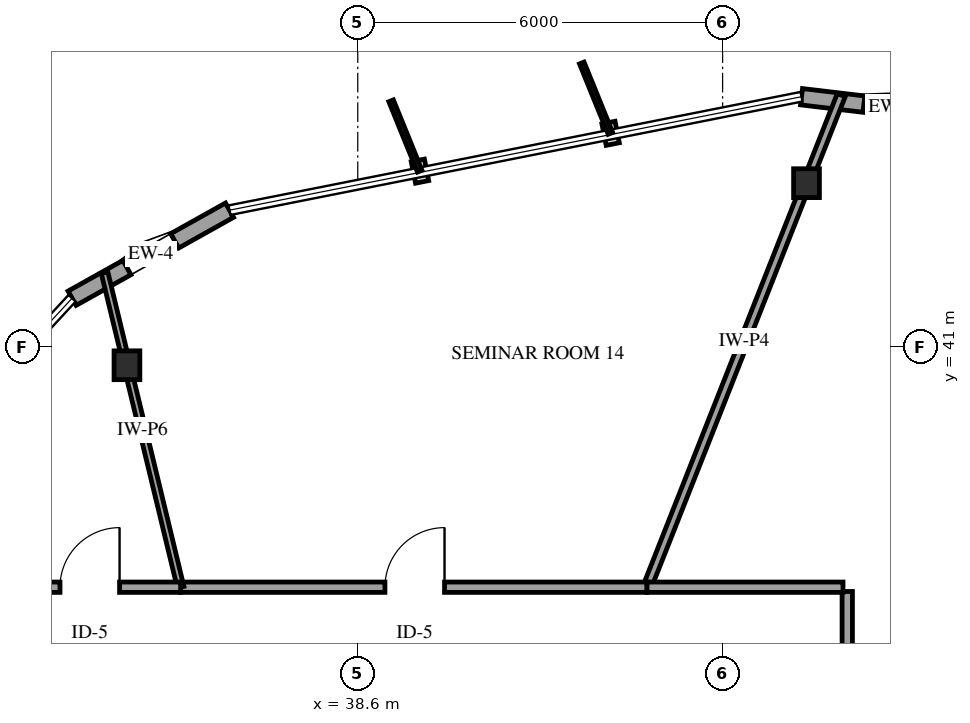
"""IFC4 building model, lengths in metres.
Left out: names, types, materials, properties, quantities, classifications, styles, units other than length and angle.
Written with IfcOpenShell. Run it as: python <this file> out.ifc"""

import sys

from ifc_helpers import new_model, si_unit, direction, frame, frame_2d, origin, origin_2d, place, context, subcontext, project, spatial, rectangle, i_section, extrude, element, fill, save


model = new_model("IFC4")
c1 = context("Model", 3, precision=1e-05, world=origin(), true_north=direction((0.0, 1.0)))
c2 = subcontext(c1, "Body", "Model", "MODEL_VIEW")
j1 = project(units=[si_unit("LENGTHUNIT", "METRE"), si_unit("PLANEANGLEUNIT", "RADIAN")], contexts=[c1])
p1 = place(None, origin())
s1 = spatial("IfcSite", under=j1, at=p1, CompositionType="ELEMENT")
p2 = place(p1, origin())
s2 = spatial("IfcBuilding", under=s1, at=p2, CompositionType="ELEMENT")
p3 = place(p2, frame((0.0, 0.0, 70.6)))
s3 = spatial("IfcBuildingStorey", under=s2, at=p3, CompositionType="ELEMENT", Elevation=70.6)
for number, where, z_axis, x_axis in (
    (1, (45.98, 43.694, 0.0), (0.0, 0.0, 1.0), (1.0, 0.0, 0.0)),
    (2, (34.804, 40.7, 0.0), (0.0, 0.0, 1.0), (1.0, 0.0, 0.0)),
):
    element("IfcColumn", number, at=place(p3, frame(where, z_axis=z_axis, x_axis=x_axis)), inside=s3, PredefinedType="COLUMN", context=c2, shape_type="SweptSolid", body=[
        extrude(i_section(OverallWidth=0.424, OverallDepth=0.474, WebThickness=0.048, FlangeThickness=0.077, FilletRadius=0.038, at=origin_2d()), origin(), (0.0, 0.0, 1.0), 4.0),
    ])
p4 = place(p3, frame((48.844, 44.766, 0.0), z_axis=(0.0, 0.0, 1.0), x_axis=(-0.993011715875, 0.118015813075, 0.0)))
e3 = element("IfcWall", 3, at=p4, inside=s3, PredefinedType="SOLIDWALL", context=c2, shape_type="SweptSolid", body=[
    extrude(rectangle(XDim=2.967, YDim=0.27, at=frame_2d((1.483, 0.0))), origin(), (0.0, 0.0, 1.0), 3.079),
])
p5 = place(p4, frame((1.033, 0.0, 0.75)))
e4 = element("IfcOpeningElement", 4, at=p5, cuts=e3, PredefinedType="OPENING", context=c2, shape_type="SweptSolid", body=[
    extrude(rectangle(XDim=0.9, YDim=1.5, at=frame_2d((0.45, 0.75))), frame((0.0, 0.145, 0.0), z_axis=(0.0, -1.0, 0.0), x_axis=(1.0, 0.0, 0.0)), (0.0, 0.0, 1.0), 0.29),
])
p6 = place(p3, frame((36.491, 43.25, 0.0), z_axis=(0.0, 0.0, 1.0), x_axis=(-0.872744478874, -0.48817729832, 0.0)))
e5 = element("IfcWall", 5, at=p6, inside=s3, PredefinedType="SOLIDWALL", context=c2, shape_type="SweptSolid", body=[
    extrude(rectangle(XDim=2.967, YDim=0.27, at=frame_2d((1.483, 0.0))), origin(), (0.0, 0.0, 1.0), 3.079),
])
p7 = place(p6, frame((1.033, 0.0, 0.75)))
e6 = element("IfcOpeningElement", 6, at=p7, cuts=e5, PredefinedType="OPENING", context=c2, shape_type="SweptSolid", body=[
    extrude(rectangle(XDim=0.9, YDim=1.5, at=frame_2d((0.45, 0.75))), frame((0.0, 0.145, 0.0), z_axis=(0.0, -1.0, 0.0), x_axis=(1.0, 0.0, 0.0)), (0.0, 0.0, 1.0), 0.29),
])
p8 = place(p3, frame((46.65, 31.442, 0.0), z_axis=(0.0, 0.0, 1.0), x_axis=(0.780822711773, 0.624752665284, 0.0)))
e7 = element("IfcWall", 7, at=p8, inside=s3, PredefinedType="PARTITIONING", context=c2, shape_type="SweptSolid", body=[
    extrude(rectangle(XDim=14.468, YDim=0.11, at=frame_2d((7.234, 0.0))), origin(), (0.0, 0.0, 1.0), 3.7),
])
p9 = place(p3, frame((43.357, 37.05, 0.0), z_axis=(0.0, 0.0, 1.0), x_axis=(0.36715311674, 0.930160517797, 0.0)))
e8 = element("IfcWall", 8, at=p9, inside=s3, PredefinedType="PARTITIONING", context=c2, shape_type="SweptSolid", body=[
    extrude(rectangle(XDim=8.7, YDim=0.14, at=frame_2d((4.35, 0.0))), origin(), (0.0, 0.0, 1.0), 2.995),
])
p10 = place(p3, frame((35.687, 37.05, 0.0), z_axis=(0.0, 0.0, 1.0), x_axis=(1.0, 0.0, 0.0)))
e9 = element("IfcWall", 9, at=p10, inside=s3, PredefinedType="PARTITIONING", context=c2, shape_type="SweptSolid", body=[
    extrude(rectangle(XDim=7.67, YDim=0.17, at=frame_2d((3.835, 0.0))), origin(), (0.0, 0.0, 1.0), 3.7),
])
p11 = place(p10, frame((3.36, 0.0, 0.0)))
e10 = element("IfcOpeningElement", 10, at=p11, cuts=e9, PredefinedType="OPENING", context=c2, shape_type="SweptSolid", body=[
    extrude(rectangle(XDim=0.98, YDim=2.15, at=frame_2d((0.49, 1.075))), frame((0.0, 0.095, 0.0), z_axis=(0.0, -1.0, 0.0), x_axis=(1.0, 0.0, 0.0)), (0.0, 0.0, 1.0), 0.19),
])
p12 = place(p3, frame((46.65, 36.98, 0.0), z_axis=(0.0, 0.0, 1.0), x_axis=(0.0, -1.0, 0.0)))
e11 = element("IfcWall", 11, at=p12, inside=s3, PredefinedType="PARTITIONING", context=c2, shape_type="SweptSolid", body=[
    extrude(rectangle(XDim=5.538, YDim=0.17, at=frame_2d((2.769, 0.0))), origin(), (0.0, 0.0, 1.0), 3.7),
])
p13 = place(p12, frame((2.294, 0.0, 0.0)))
e12 = element("IfcOpeningElement", 12, at=p13, cuts=e11, PredefinedType="OPENING", context=c2, shape_type="SweptSolid", body=[
    extrude(rectangle(XDim=0.98, YDim=2.15, at=frame_2d((0.49, 1.075))), frame((0.0, 0.095, 0.0), z_axis=(0.0, -1.0, 0.0), x_axis=(1.0, 0.0, 0.0)), (0.0, 0.0, 1.0), 0.19),
])
p14 = place(p3, frame((35.687, 37.05, 0.0), z_axis=(0.0, 0.0, 1.0), x_axis=(-0.235059048373, 0.971981092295, 0.0)))
e13 = element("IfcWall", 13, at=p14, inside=s3, PredefinedType="PARTITIONING", context=c2, shape_type="SweptSolid", body=[
    extrude(rectangle(XDim=5.322, YDim=0.11, at=frame_2d((2.661, 0.0))), origin(), (0.0, 0.0, 1.0), 2.995),
])
p15 = place(p3, frame((43.357, 37.05, 0.0), z_axis=(0.0, 0.0, 1.0), x_axis=(1.0, 0.0, 0.0)))
e14 = element("IfcWall", 14, at=p15, inside=s3, PredefinedType="PARTITIONING", context=c2, shape_type="SweptSolid", body=[
    extrude(rectangle(XDim=3.223, YDim=0.17, at=frame_2d((1.612, 0.0))), origin(), (0.0, 0.0, 1.0), 3.7),
])
p16 = place(p3, frame((32.67, 37.05, 0.0), z_axis=(0.0, 0.0, 1.0), x_axis=(1.0, 0.0, 0.0)))
e15 = element("IfcWall", 15, at=p16, inside=s3, PredefinedType="PARTITIONING", context=c2, shape_type="SweptSolid", body=[
    extrude(rectangle(XDim=3.017, YDim=0.17, at=frame_2d((1.509, 0.0))), origin(), (0.0, 0.0, 1.0), 3.7),
])
p17 = place(p16, frame((1.033, 0.0, 0.0)))
e16 = element("IfcOpeningElement", 16, at=p17, cuts=e15, PredefinedType="OPENING", context=c2, shape_type="SweptSolid", body=[
    extrude(rectangle(XDim=0.98, YDim=2.15, at=frame_2d((0.49, 1.075))), frame((0.0, 0.095, 0.0), z_axis=(0.0, -1.0, 0.0), x_axis=(1.0, 0.0, 0.0)), (0.0, 0.0, 1.0), 0.19),
])
p18 = place(p5, origin())
e17 = element("IfcWindow", 17, at=p18, inside=s3, PartitioningType="SINGLE_PANEL", PredefinedType="WINDOW", context=c2, shape_type="SweptSolid", body=[
    extrude(rectangle(XDim=0.9, YDim=1.5, at=frame_2d((0.45, 0.75))), frame((0.0, 0.03, 0.0), z_axis=(0.0, -1.0, 0.0), x_axis=(1.0, 0.0, 0.0)), (0.0, 0.0, 1.0), 0.06),
])
fill(e4, e17)
p19 = place(p7, origin())
e18 = element("IfcWindow", 18, at=p19, inside=s3, PartitioningType="SINGLE_PANEL", PredefinedType="WINDOW", context=c2, shape_type="SweptSolid", body=[
    extrude(rectangle(XDim=0.9, YDim=1.5, at=frame_2d((0.45, 0.75))), frame((0.0, 0.03, 0.0), z_axis=(0.0, -1.0, 0.0), x_axis=(1.0, 0.0, 0.0)), (0.0, 0.0, 1.0), 0.06),
])
fill(e6, e18)
p20 = place(p11, origin())
e19 = element("IfcDoor", 19, at=p20, inside=s3, OperationType="SINGLE_SWING_RIGHT", PredefinedType="DOOR", context=c2, shape_type="SweptSolid", body=[
    extrude(rectangle(XDim=0.98, YDim=2.15, at=frame_2d((0.49, 1.075))), frame((0.0, 0.025, 0.0), z_axis=(0.0, -1.0, 0.0), x_axis=(1.0, 0.0, 0.0)), (0.0, 0.0, 1.0), 0.05),
])
fill(e10, e19)
p21 = place(p17, origin())
e20 = element("IfcDoor", 20, at=p21, inside=s3, OperationType="SINGLE_SWING_RIGHT", PredefinedType="DOOR", context=c2, shape_type="SweptSolid", body=[
    extrude(rectangle(XDim=0.98, YDim=2.15, at=frame_2d((0.49, 1.075))), frame((0.0, 0.025, 0.0), z_axis=(0.0, -1.0, 0.0), x_axis=(1.0, 0.0, 0.0)), (0.0, 0.0, 1.0), 0.05),
])
fill(e16, e20)
save(model, sys.argv[1])
